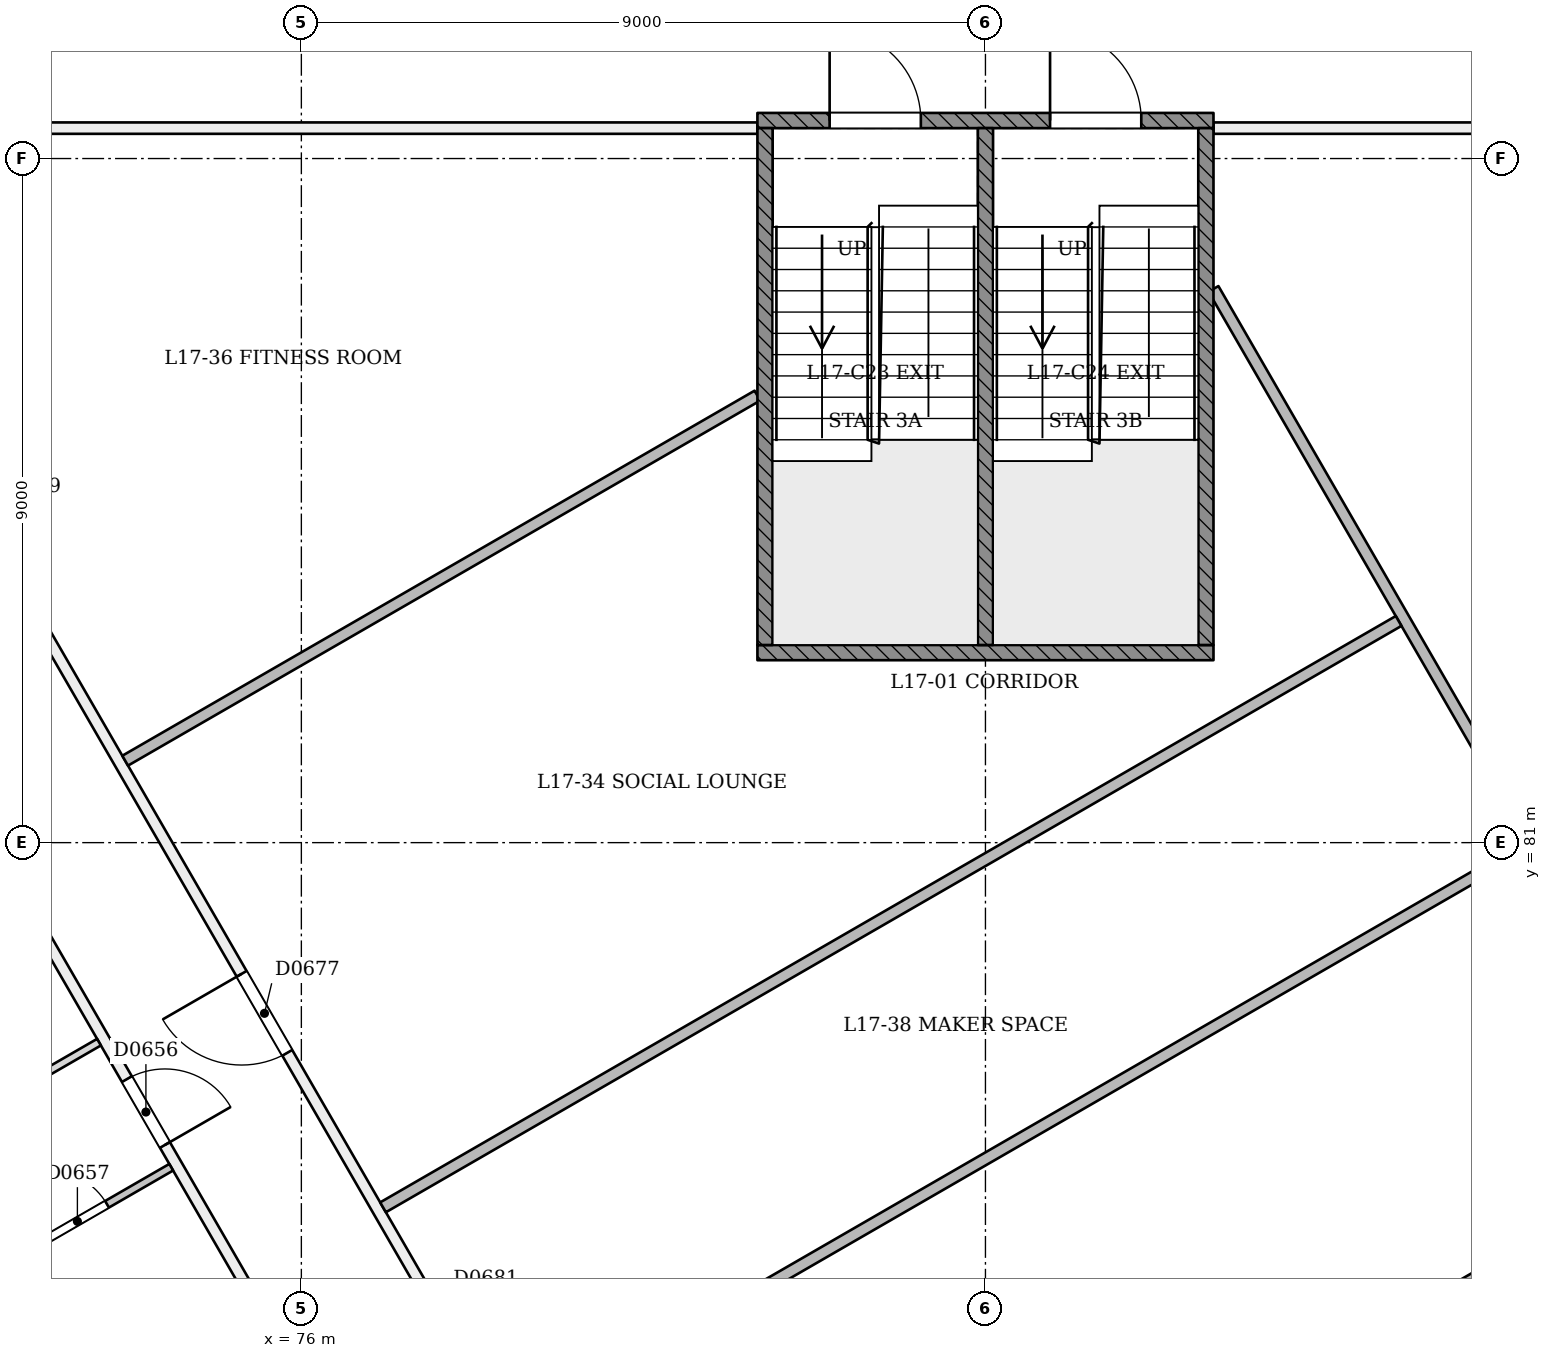
"""IFC4 building model, lengths in metres.
Left out: names, types, materials, properties, quantities, classifications, styles, units other than length and angle.
Written with IfcOpenShell. Run it as: python <this file> out.ifc"""

import sys

from ifc_helpers import new_model, si_unit, direction, frame, frame_2d, origin, place, context, subcontext, project, spatial, rectangle, extrude, element, fill, save


model = new_model("IFC4")
c1 = context("Model", 3, precision=1e-05, world=origin(), true_north=direction((0.0, 1.0)))
c2 = subcontext(c1, "Body", "Model", "MODEL_VIEW")
j1 = project(units=[si_unit("LENGTHUNIT", "METRE"), si_unit("PLANEANGLEUNIT", "RADIAN")], contexts=[c1])
p1 = place(None, origin())
s1 = spatial("IfcSite", under=j1, at=p1, CompositionType="ELEMENT")
p2 = place(p1, origin())
s2 = spatial("IfcBuilding", under=s1, at=p2, CompositionType="ELEMENT")
p3 = place(p2, frame((0.0, 0.0, 70.2)))
s3 = spatial("IfcBuildingStorey", under=s2, at=p3, CompositionType="ELEMENT", Elevation=70.2)
p4 = place(p3, frame((62.59, 97.14, 0.0), z_axis=(0.0, 0.0, 1.0), x_axis=(0.500002288388, -0.866024082579, 0.0)))
e1 = element("IfcWall", 1, at=p4, inside=s3, PredefinedType="PARTITIONING", context=c2, shape_type="SweptSolid", body=[
    extrude(rectangle(XDim=43.248, YDim=0.15, at=frame_2d((21.624, 0.0))), origin(), (0.0, 0.0, 1.0), 2.7),
])
p5 = place(p4, frame((1.28, 0.0, 0.0)))
e2 = element("IfcOpeningElement", 2, at=p5, cuts=e1, PredefinedType="OPENING", context=c2, shape_type="SweptSolid", body=[
    extrude(rectangle(XDim=1.0, YDim=2.1, at=frame_2d((0.5, 1.05))), frame((0.0, 0.085, 0.0), z_axis=(0.0, -1.0, 0.0), x_axis=(1.0, 0.0, 0.0)), (0.0, 0.0, 1.0), 0.171),
])
p6 = place(p4, frame((4.195, 0.0, 0.0)))
e3 = element("IfcOpeningElement", 3, at=p6, cuts=e1, PredefinedType="OPENING", context=c2, shape_type="SweptSolid", body=[
    extrude(rectangle(XDim=1.1, YDim=2.1, at=frame_2d((0.55, 1.05))), frame((0.0, 0.085, 0.0), z_axis=(0.0, -1.0, 0.0), x_axis=(1.0, 0.0, 0.0)), (0.0, 0.0, 1.0), 0.171),
])
p7 = place(p4, frame((10.904, 0.0, 0.0)))
e4 = element("IfcOpeningElement", 4, at=p7, cuts=e1, PredefinedType="OPENING", context=c2, shape_type="SweptSolid", body=[
    extrude(rectangle(XDim=1.0, YDim=2.1, at=frame_2d((0.5, 1.05))), frame((0.0, 0.085, 0.0), z_axis=(0.0, -1.0, 0.0), x_axis=(1.0, 0.0, 0.0)), (0.0, 0.0, 1.0), 0.171),
])
p8 = place(p4, frame((17.624, 0.0, 0.0)))
e5 = element("IfcOpeningElement", 5, at=p8, cuts=e1, PredefinedType="OPENING", context=c2, shape_type="SweptSolid", body=[
    extrude(rectangle(XDim=1.2, YDim=2.1, at=frame_2d((0.6, 1.05))), frame((0.0, 0.085, 0.0), z_axis=(0.0, -1.0, 0.0), x_axis=(1.0, 0.0, 0.0)), (0.0, 0.0, 1.0), 0.171),
])
p9 = place(p4, frame((22.229, 0.0, 0.0)))
e6 = element("IfcOpeningElement", 6, at=p9, cuts=e1, PredefinedType="OPENING", context=c2, shape_type="SweptSolid", body=[
    extrude(rectangle(XDim=1.0, YDim=2.1, at=frame_2d((0.5, 1.05))), frame((0.0, 0.085, 0.0), z_axis=(0.0, -1.0, 0.0), x_axis=(1.0, 0.0, 0.0)), (0.0, 0.0, 1.0), 0.171),
])
p10 = place(p4, frame((28.904, 0.0, 0.0)))
e7 = element("IfcOpeningElement", 7, at=p10, cuts=e1, PredefinedType="OPENING", context=c2, shape_type="SweptSolid", body=[
    extrude(rectangle(XDim=1.0, YDim=2.1, at=frame_2d((0.5, 1.05))), frame((0.0, 0.085, 0.0), z_axis=(0.0, -1.0, 0.0), x_axis=(1.0, 0.0, 0.0)), (0.0, 0.0, 1.0), 0.171),
])
p11 = place(p4, frame((32.374, 0.0, 0.0)))
e8 = element("IfcOpeningElement", 8, at=p11, cuts=e1, PredefinedType="OPENING", context=c2, shape_type="SweptSolid", body=[
    extrude(rectangle(XDim=1.0, YDim=2.1, at=frame_2d((0.5, 1.05))), frame((0.0, 0.085, 0.0), z_axis=(0.0, -1.0, 0.0), x_axis=(1.0, 0.0, 0.0)), (0.0, 0.0, 1.0), 0.171),
])
p12 = place(p4, frame((38.618, 0.0, 0.0)))
e9 = element("IfcOpeningElement", 9, at=p12, cuts=e1, PredefinedType="OPENING", context=c2, shape_type="SweptSolid", body=[
    extrude(rectangle(XDim=1.2, YDim=2.1, at=frame_2d((0.6, 1.05))), frame((0.0, 0.085, 0.0), z_axis=(0.0, -1.0, 0.0), x_axis=(1.0, 0.0, 0.0)), (0.0, 0.0, 1.0), 0.171),
])
p13 = place(p3, frame((85.785, 59.686, 0.0), z_axis=(0.0, 0.0, 1.0), x_axis=(0.500002288388, 0.866024082579, 0.0)))
e10 = element("IfcWall", 10, at=p13, inside=s3, PredefinedType="PARTITIONING", context=c2, shape_type="SweptSolid", body=[
    extrude(rectangle(XDim=43.248, YDim=0.15, at=frame_2d((21.624, 0.0))), origin(), (0.0, 0.0, 1.0), 2.7),
])
p14 = place(p13, frame((0.256, 0.0, 0.0)))
e11 = element("IfcOpeningElement", 11, at=p14, cuts=e10, PredefinedType="OPENING", context=c2, shape_type="SweptSolid", body=[
    extrude(rectangle(XDim=1.2, YDim=2.1, at=frame_2d((0.6, 1.05))), frame((0.0, 0.085, 0.0), z_axis=(0.0, -1.0, 0.0), x_axis=(1.0, 0.0, 0.0)), (0.0, 0.0, 1.0), 0.171),
])
p15 = place(p13, frame((4.229, 0.0, 0.0)))
e12 = element("IfcOpeningElement", 12, at=p15, cuts=e10, PredefinedType="OPENING", context=c2, shape_type="SweptSolid", body=[
    extrude(rectangle(XDim=1.0, YDim=2.1, at=frame_2d((0.5, 1.05))), frame((0.0, 0.085, 0.0), z_axis=(0.0, -1.0, 0.0), x_axis=(1.0, 0.0, 0.0)), (0.0, 0.0, 1.0), 0.171),
])
p16 = place(p13, frame((10.904, 0.0, 0.0)))
e13 = element("IfcOpeningElement", 13, at=p16, cuts=e10, PredefinedType="OPENING", context=c2, shape_type="SweptSolid", body=[
    extrude(rectangle(XDim=1.0, YDim=2.1, at=frame_2d((0.5, 1.05))), frame((0.0, 0.085, 0.0), z_axis=(0.0, -1.0, 0.0), x_axis=(1.0, 0.0, 0.0)), (0.0, 0.0, 1.0), 0.171),
])
p17 = place(p13, frame((13.345, 0.0, 0.0)))
e14 = element("IfcOpeningElement", 14, at=p17, cuts=e10, PredefinedType="OPENING", context=c2, shape_type="SweptSolid", body=[
    extrude(rectangle(XDim=1.0, YDim=2.1, at=frame_2d((0.5, 1.05))), frame((0.0, 0.085, 0.0), z_axis=(0.0, -1.0, 0.0), x_axis=(1.0, 0.0, 0.0)), (0.0, 0.0, 1.0), 0.171),
])
p18 = place(p13, frame((21.024, 0.0, 0.0)))
e15 = element("IfcOpeningElement", 15, at=p18, cuts=e10, PredefinedType="OPENING", context=c2, shape_type="SweptSolid", body=[
    extrude(rectangle(XDim=1.2, YDim=2.1, at=frame_2d((0.6, 1.05))), frame((0.0, 0.085, 0.0), z_axis=(0.0, -1.0, 0.0), x_axis=(1.0, 0.0, 0.0)), (0.0, 0.0, 1.0), 0.171),
])
p19 = place(p13, frame((28.904, 0.0, 0.0)))
e16 = element("IfcOpeningElement", 16, at=p19, cuts=e10, PredefinedType="OPENING", context=c2, shape_type="SweptSolid", body=[
    extrude(rectangle(XDim=1.0, YDim=2.1, at=frame_2d((0.5, 1.05))), frame((0.0, 0.085, 0.0), z_axis=(0.0, -1.0, 0.0), x_axis=(1.0, 0.0, 0.0)), (0.0, 0.0, 1.0), 0.171),
])
p20 = place(p13, frame((31.195, 0.0, 0.0)))
e17 = element("IfcOpeningElement", 17, at=p20, cuts=e10, PredefinedType="OPENING", context=c2, shape_type="SweptSolid", body=[
    extrude(rectangle(XDim=1.1, YDim=2.1, at=frame_2d((0.55, 1.05))), frame((0.0, 0.085, 0.0), z_axis=(0.0, -1.0, 0.0), x_axis=(1.0, 0.0, 0.0)), (0.0, 0.0, 1.0), 0.171),
])
p21 = place(p13, frame((38.618, 0.0, 0.0)))
e18 = element("IfcOpeningElement", 18, at=p21, cuts=e10, PredefinedType="OPENING", context=c2, shape_type="SweptSolid", body=[
    extrude(rectangle(XDim=1.2, YDim=2.1, at=frame_2d((0.6, 1.05))), frame((0.0, 0.085, 0.0), z_axis=(0.0, -1.0, 0.0), x_axis=(1.0, 0.0, 0.0)), (0.0, 0.0, 1.0), 0.171),
])
p22 = place(p3, frame((88.0, 90.4, 0.0), z_axis=(0.0, 0.0, 1.0), x_axis=(1.0, 0.0, 0.0)))
e19 = element("IfcWall", 19, at=p22, inside=s3, PredefinedType="PARTITIONING", context=c2, shape_type="SweptSolid", body=[
    extrude(rectangle(XDim=13.079, YDim=0.15, at=frame_2d((6.54, 0.0))), origin(), (0.0, 0.0, 1.0), 3.1),
])
p23 = place(p3, frame((101.209, 90.4, 0.0), z_axis=(0.0, 0.0, 1.0), x_axis=(-0.500001034453, -0.866024806542, 0.0)))
e20 = element("IfcWall", 20, at=p23, inside=s3, PredefinedType="PARTITIONING", context=c2, shape_type="SweptSolid", body=[
    extrude(rectangle(XDim=32.418, YDim=0.15, at=frame_2d((16.209, 0.0))), origin(), (0.0, 0.0, 1.0), 3.1),
])
p24 = place(p23, frame((6.612, 0.0, 0.0)))
e21 = element("IfcOpeningElement", 21, at=p24, cuts=e20, PredefinedType="OPENING", context=c2, shape_type="SweptSolid", body=[
    extrude(rectangle(XDim=1.2, YDim=2.1, at=frame_2d((0.6, 1.05))), frame((0.0, 0.085, 0.0), z_axis=(0.0, -1.0, 0.0), x_axis=(1.0, 0.0, 0.0)), (0.0, 0.0, 1.0), 0.171),
])
p25 = place(p23, frame((15.296, 0.0, 0.0)))
e22 = element("IfcOpeningElement", 22, at=p25, cuts=e20, PredefinedType="OPENING", context=c2, shape_type="SweptSolid", body=[
    extrude(rectangle(XDim=1.2, YDim=2.1, at=frame_2d((0.6, 1.05))), frame((0.0, 0.085, 0.0), z_axis=(0.0, -1.0, 0.0), x_axis=(1.0, 0.0, 0.0)), (0.0, 0.0, 1.0), 0.171),
])
p26 = place(p23, frame((25.157, 0.0, 0.0)))
e23 = element("IfcOpeningElement", 23, at=p26, cuts=e20, PredefinedType="OPENING", context=c2, shape_type="SweptSolid", body=[
    extrude(rectangle(XDim=1.2, YDim=2.1, at=frame_2d((0.6, 1.05))), frame((0.0, 0.085, 0.0), z_axis=(0.0, -1.0, 0.0), x_axis=(1.0, 0.0, 0.0)), (0.0, 0.0, 1.0), 0.171),
])
p27 = place(p3, frame((84.935, 62.438, 0.0), z_axis=(0.0, 0.0, 1.0), x_axis=(-0.499998663172, 0.866026175601, 0.0)))
e24 = element("IfcWall", 24, at=p27, inside=s3, PredefinedType="PARTITIONING", context=c2, shape_type="SweptSolid", body=[
    extrude(rectangle(XDim=32.288, YDim=0.15, at=frame_2d((16.144, 0.0))), origin(), (0.0, 0.0, 1.0), 3.1),
])
p28 = place(p27, frame((18.241, 0.0, 0.0)))
e25 = element("IfcOpeningElement", 25, at=p28, cuts=e24, PredefinedType="OPENING", context=c2, shape_type="SweptSolid", body=[
    extrude(rectangle(XDim=1.2, YDim=2.1, at=frame_2d((0.6, 1.05))), frame((0.0, 0.085, 0.0), z_axis=(0.0, -1.0, 0.0), x_axis=(1.0, 0.0, 0.0)), (0.0, 0.0, 1.0), 0.171),
])
p29 = place(p27, frame((25.591, 0.0, 0.0)))
e26 = element("IfcOpeningElement", 26, at=p29, cuts=e24, PredefinedType="OPENING", context=c2, shape_type="SweptSolid", body=[
    extrude(rectangle(XDim=1.2, YDim=2.1, at=frame_2d((0.6, 1.05))), frame((0.0, 0.085, 0.0), z_axis=(0.0, -1.0, 0.0), x_axis=(1.0, 0.0, 0.0)), (0.0, 0.0, 1.0), 0.171),
])
p30 = place(p27, frame((13.545, 0.0, 0.0)))
e27 = element("IfcOpeningElement", 27, at=p30, cuts=e24, PredefinedType="OPENING", context=c2, shape_type="SweptSolid", body=[
    extrude(rectangle(XDim=1.2, YDim=2.1, at=frame_2d((0.6, 1.05))), frame((0.0, 0.085, 0.0), z_axis=(0.0, -1.0, 0.0), x_axis=(1.0, 0.0, 0.0)), (0.0, 0.0, 1.0), 0.171),
])
p31 = place(p3, frame((68.921, 90.4, 0.0), z_axis=(0.0, 0.0, 1.0), x_axis=(1.0, 0.0, 0.0)))
e28 = element("IfcWall", 28, at=p31, inside=s3, PredefinedType="PARTITIONING", context=c2, shape_type="SweptSolid", body=[
    extrude(rectangle(XDim=13.079, YDim=0.15, at=frame_2d((6.54, 0.0))), origin(), (0.0, 0.0, 1.0), 3.1),
])
p32 = place(p3, frame((67.843, 75.202, 0.0), z_axis=(0.0, 0.0, 1.0), x_axis=(0.866025401434, 0.500000004071, 0.0)))
e29 = element("IfcWall", 29, at=p32, inside=s3, PredefinedType="PARTITIONING", context=c2, shape_type="SweptSolid", body=[
    extrude(rectangle(XDim=6.345, YDim=0.1, at=frame_2d((3.173, 0.0))), origin(), (0.0, 0.0, 1.0), 2.6),
])
p33 = place(p3, frame((73.017, 73.08, 0.0), z_axis=(0.0, 0.0, 1.0), x_axis=(-0.499976333282, 0.866039067339, 0.0)))
e30 = element("IfcWall", 30, at=p33, inside=s3, PredefinedType="PARTITIONING", context=c2, shape_type="SweptSolid", body=[
    extrude(rectangle(XDim=2.525, YDim=0.1, at=frame_2d((1.262, 0.0))), origin(), (0.0, 0.0, 1.0), 2.7),
])
p34 = place(p3, frame((71.754, 75.267, 0.0), z_axis=(0.0, 0.0, 1.0), x_axis=(0.866046596414, 0.499963291492, 0.0)))
e31 = element("IfcWall", 31, at=p34, inside=s3, PredefinedType="PARTITIONING", context=c2, shape_type="SweptSolid", body=[
    extrude(rectangle(XDim=2.925, YDim=0.1, at=frame_2d((1.462, 0.0))), origin(), (0.0, 0.0, 1.0), 3.1),
])
p35 = place(p34, frame((1.05, 0.0, 0.0)))
e32 = element("IfcOpeningElement", 32, at=p35, cuts=e31, PredefinedType="OPENING", context=c2, shape_type="SweptSolid", body=[
    extrude(rectangle(XDim=0.9, YDim=2.1, at=frame_2d((0.45, 1.05))), frame((0.0, 0.061, 0.0), z_axis=(0.0, -1.0, 0.0), x_axis=(1.0, 0.0, 0.0)), (0.0, 0.0, 1.0), 0.121),
])
p36 = place(p3, frame((88.0, 88.285, 0.0), z_axis=(0.0, 0.0, 1.0), x_axis=(0.499998697147, -0.866026155985, 0.0)))
e33 = element("IfcWall", 33, at=p36, inside=s3, PredefinedType="PARTITIONING", context=c2, shape_type="SweptSolid", body=[
    extrude(rectangle(XDim=11.858, YDim=0.15, at=frame_2d((5.929, 0.0))), origin(), (0.0, 0.0, 1.0), 3.1),
])
p37 = place(p3, frame((82.0, 86.881, 0.0), z_axis=(0.0, 0.0, 1.0), x_axis=(-0.866017959571, -0.500012893534, 0.0)))
e34 = element("IfcWall", 34, at=p37, inside=s3, PredefinedType="PARTITIONING", context=c2, shape_type="SweptSolid", body=[
    extrude(rectangle(XDim=9.605, YDim=0.15, at=frame_2d((4.802, 0.0))), origin(), (0.0, 0.0, 1.0), 3.1),
])
p38 = place(p3, frame((77.075, 76.202, 0.0), z_axis=(0.0, 0.0, 1.0), x_axis=(0.866019036803, 0.500011027772, 0.0)))
e35 = element("IfcWall", 35, at=p38, inside=s3, PredefinedType="PARTITIONING", context=c2, shape_type="SweptSolid", body=[
    extrude(rectangle(XDim=15.428, YDim=0.15, at=frame_2d((7.714, 0.0))), origin(), (0.0, 0.0, 1.0), 3.1),
])
p39 = place(p3, frame((81.068, 69.285, 0.0), z_axis=(0.0, 0.0, 1.0), x_axis=(0.866029476959, 0.499992944988, 0.0)))
e36 = element("IfcWall", 36, at=p39, inside=s3, PredefinedType="PARTITIONING", context=c2, shape_type="SweptSolid", body=[
    extrude(rectangle(XDim=13.49, YDim=0.15, at=frame_2d((6.745, 0.0))), origin(), (0.0, 0.0, 1.0), 3.1),
])
p40 = place(p3, frame((92.141, 80.962, 0.0), z_axis=(0.0, 0.0, 1.0), x_axis=(-0.866025889145, -0.499999159329, 0.0)))
e37 = element("IfcWall", 37, at=p40, inside=s3, PredefinedType="PARTITIONING", context=c2, shape_type="SweptSolid", body=[
    extrude(rectangle(XDim=15.428, YDim=0.15, at=frame_2d((7.714, 0.0))), origin(), (0.0, 0.0, 1.0), 3.1),
])
p41 = place(p3, frame((82.0, 90.5, 0.0), z_axis=(0.0, 0.0, 1.0), x_axis=(1.0, 0.0, 0.0)))
e38 = element("IfcWall", 38, at=p41, inside=s3, PredefinedType="SOLIDWALL", context=c2, shape_type="SweptSolid", body=[
    extrude(rectangle(XDim=6.0, YDim=0.2, at=frame_2d((3.0, 0.0))), origin(), (0.0, 0.0, 1.0), 3.1),
])
p42 = place(p41, frame((0.95, 0.0, 0.0)))
e39 = element("IfcOpeningElement", 39, at=p42, cuts=e38, PredefinedType="OPENING", context=c2, shape_type="SweptSolid", body=[
    extrude(rectangle(XDim=1.2, YDim=2.1, at=frame_2d((0.6, 1.05))), frame((0.0, 0.11, 0.0), z_axis=(0.0, -1.0, 0.0), x_axis=(1.0, 0.0, 0.0)), (0.0, 0.0, 1.0), 0.221),
])
p43 = place(p41, frame((3.85, 0.0, 0.0)))
e40 = element("IfcOpeningElement", 40, at=p43, cuts=e38, PredefinedType="OPENING", context=c2, shape_type="SweptSolid", body=[
    extrude(rectangle(XDim=1.2, YDim=2.1, at=frame_2d((0.6, 1.05))), frame((0.0, 0.11, 0.0), z_axis=(0.0, -1.0, 0.0), x_axis=(1.0, 0.0, 0.0)), (0.0, 0.0, 1.0), 0.221),
])
p44 = place(p3, frame((82.0, 83.5, 0.0), z_axis=(0.0, 0.0, 1.0), x_axis=(1.0, 0.0, 0.0)))
e41 = element("IfcWall", 41, at=p44, inside=s3, PredefinedType="SOLIDWALL", context=c2, shape_type="SweptSolid", body=[
    extrude(rectangle(XDim=6.0, YDim=0.2, at=frame_2d((3.0, 0.0))), origin(), (0.0, 0.0, 1.0), 3.1),
])
for number, where, z_axis, x_axis in (
    (42, (82.1, 83.6, 0.0), (0.0, 0.0, 1.0), (0.0, 1.0, 0.0)),
    (43, (87.9, 83.6, 0.0), (0.0, 0.0, 1.0), (0.0, 1.0, 0.0)),
    (44, (85.0, 83.6, 0.0), (0.0, 0.0, 1.0), (0.0, 1.0, 0.0)),
):
    element("IfcWall", number, at=place(p3, frame(where, z_axis=z_axis, x_axis=x_axis)), inside=s3, PredefinedType="SOLIDWALL", context=c2, shape_type="SweptSolid", body=[
        extrude(rectangle(XDim=6.8, YDim=0.2, at=frame_2d((3.4, 0.0))), origin(), (0.0, 0.0, 1.0), 3.1),
    ])
p45 = place(p9, origin())
e45 = element("IfcDoor", 45, at=p45, inside=s3, OperationType="SINGLE_SWING_RIGHT", PredefinedType="NOTDEFINED", context=c2, shape_type="SweptSolid", body=[
    extrude(rectangle(XDim=1.0, YDim=2.1, at=frame_2d((0.5, 1.05))), frame((0.0, 0.025, 0.0), z_axis=(0.0, -1.0, 0.0), x_axis=(1.0, 0.0, 0.0)), (0.0, 0.0, 1.0), 0.05),
])
fill(e6, e45)
p46 = place(p35, origin())
e46 = element("IfcDoor", 46, at=p46, inside=s3, OperationType="SINGLE_SWING_LEFT", PredefinedType="NOTDEFINED", context=c2, shape_type="SweptSolid", body=[
    extrude(rectangle(XDim=0.9, YDim=2.1, at=frame_2d((0.45, 1.05))), frame((0.0, 0.025, 0.0), z_axis=(0.0, -1.0, 0.0), x_axis=(1.0, 0.0, 0.0)), (0.0, 0.0, 1.0), 0.05),
])
fill(e32, e46)
p47 = place(p28, origin())
e47 = element("IfcDoor", 47, at=p47, inside=s3, OperationType="SINGLE_SWING_RIGHT", PredefinedType="NOTDEFINED", context=c2, shape_type="SweptSolid", body=[
    extrude(rectangle(XDim=1.2, YDim=2.1, at=frame_2d((0.6, 1.05))), frame((0.0, 0.025, 0.0), z_axis=(0.0, -1.0, 0.0), x_axis=(1.0, 0.0, 0.0)), (0.0, 0.0, 1.0), 0.05),
])
fill(e25, e47)
p48 = place(p42, origin())
e48 = element("IfcDoor", 48, at=p48, inside=s3, OperationType="SINGLE_SWING_LEFT", PredefinedType="NOTDEFINED", context=c2, shape_type="SweptSolid", body=[
    extrude(rectangle(XDim=1.2, YDim=2.1, at=frame_2d((0.6, 1.05))), frame((0.0, 0.025, 0.0), z_axis=(0.0, -1.0, 0.0), x_axis=(1.0, 0.0, 0.0)), (0.0, 0.0, 1.0), 0.05),
])
fill(e39, e48)
p49 = place(p43, origin())
e49 = element("IfcDoor", 49, at=p49, inside=s3, OperationType="SINGLE_SWING_LEFT", PredefinedType="NOTDEFINED", context=c2, shape_type="SweptSolid", body=[
    extrude(rectangle(XDim=1.2, YDim=2.1, at=frame_2d((0.6, 1.05))), frame((0.0, 0.025, 0.0), z_axis=(0.0, -1.0, 0.0), x_axis=(1.0, 0.0, 0.0)), (0.0, 0.0, 1.0), 0.05),
])
fill(e40, e49)
save(model, sys.argv[1])
